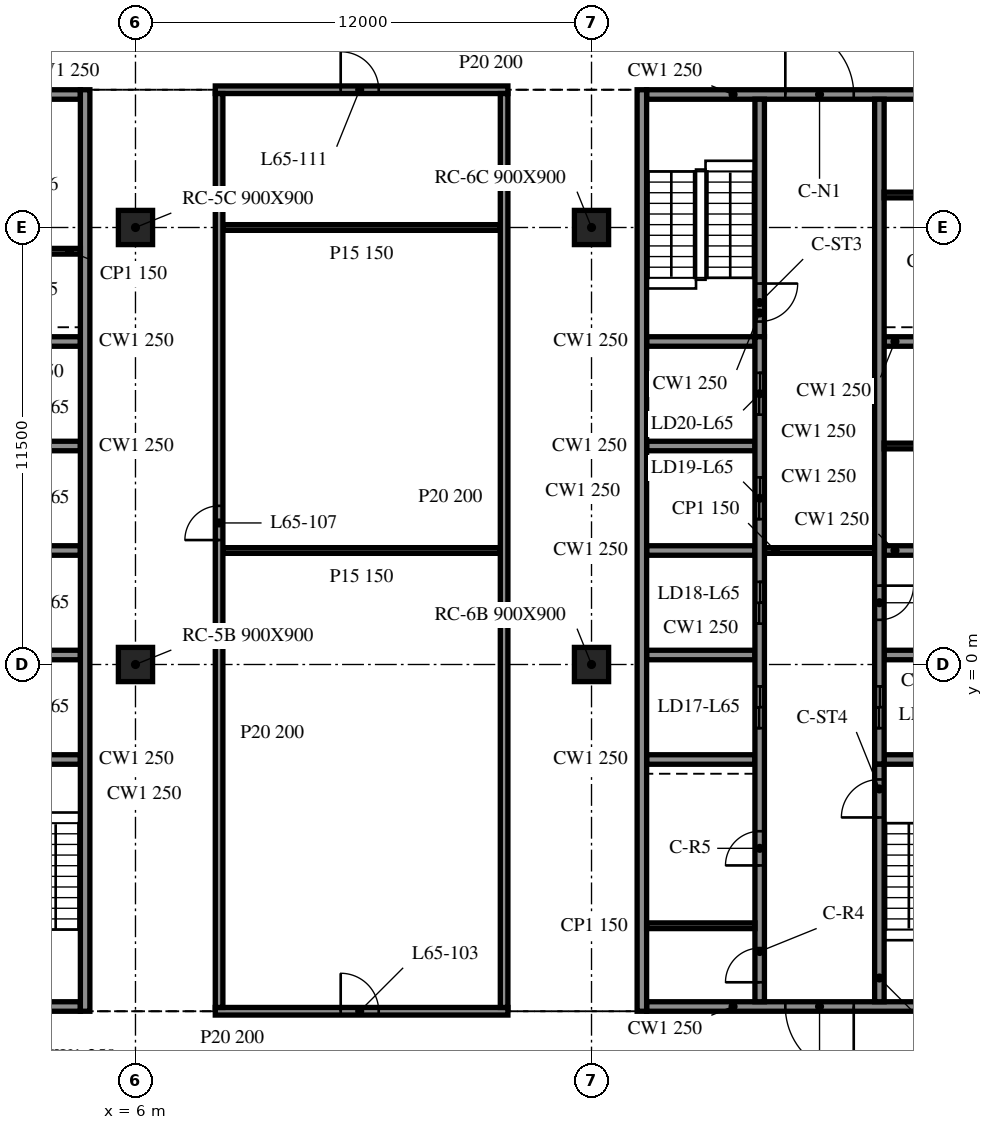
"""IFC4 building model, lengths in metres.
Left out: names, types, materials, properties, quantities, classifications, styles, units other than length and angle.
Written with IfcOpenShell. Run it as: python <this file> out.ifc"""

import sys

from ifc_helpers import new_model, si_unit, direction, frame, frame_2d, origin, origin_2d, place, context, subcontext, project, spatial, rectangle, extrude, element, fill, save


model = new_model("IFC4")
c1 = context("Model", 3, precision=1e-05, world=origin(), true_north=direction((0.0, 1.0)))
c2 = subcontext(c1, "Body", "Model", "MODEL_VIEW")
j1 = project(units=[si_unit("LENGTHUNIT", "METRE"), si_unit("PLANEANGLEUNIT", "RADIAN")], contexts=[c1])
p1 = place(None, origin())
s1 = spatial("IfcSite", under=j1, at=p1, CompositionType="ELEMENT")
p2 = place(p1, origin())
s2 = spatial("IfcBuilding", under=s1, at=p2, CompositionType="ELEMENT")
p3 = place(p2, frame((0.0, 0.0, 267.1)))
s3 = spatial("IfcBuildingStorey", under=s2, at=p3, CompositionType="ELEMENT", Elevation=267.1)
for number, where, z_axis, x_axis in (
    (1, (6.0, 0.0, -0.34), (0.0, 0.0, 1.0), (1.0, 0.0, 0.0)),
    (2, (6.0, 11.5, -0.34), (0.0, 0.0, 1.0), (1.0, 0.0, 0.0)),
    (3, (18.0, 0.0, -0.34), (0.0, 0.0, 1.0), (1.0, 0.0, 0.0)),
    (4, (18.0, 11.5, -0.34), (0.0, 0.0, 1.0), (1.0, 0.0, 0.0)),
):
    element("IfcColumn", number, at=place(p3, frame(where, z_axis=z_axis, x_axis=x_axis)), inside=s3, PredefinedType="COLUMN", context=c2, shape_type="SweptSolid", body=[
        extrude(rectangle(XDim=0.9, YDim=0.9, at=origin_2d()), origin(), (0.0, 0.0, 1.0), 3.8),
    ])
p4 = place(p3, frame((4.675, -9.125, 0.0), z_axis=(0.0, 0.0, 1.0), x_axis=(0.0, 1.0, 0.0)))
e5 = element("IfcWall", 5, at=p4, inside=s3, PredefinedType="SOLIDWALL", context=c2, shape_type="SweptSolid", body=[
    extrude(rectangle(XDim=24.25, YDim=0.25, at=frame_2d((12.125, 0.0))), origin(), (0.0, 0.0, 1.0), 3.46),
])
p5 = place(p3, frame((4.55, -9.0, 0.0), z_axis=(0.0, 0.0, 1.0), x_axis=(-1.0, 0.0, 0.0)))
e6 = element("IfcWall", 6, at=p5, inside=s3, PredefinedType="SOLIDWALL", context=c2, shape_type="SweptSolid", body=[
    extrude(rectangle(XDim=9.1, YDim=0.25, at=frame_2d((4.55, 0.0))), origin(), (0.0, 0.0, 1.0), 3.46),
])
p6 = place(p5, frame((3.65, 0.0, 0.0)))
e7 = element("IfcOpeningElement", 7, at=p6, cuts=e6, PredefinedType="OPENING", context=c2, shape_type="SweptSolid", body=[
    extrude(rectangle(XDim=1.8, YDim=2.1, at=frame_2d((0.9, 1.05))), frame((0.0, 0.135, 0.0), z_axis=(0.0, -1.0, 0.0), x_axis=(1.0, 0.0, 0.0)), (0.0, 0.0, 1.0), 0.27),
])
p7 = place(p3, frame((-4.55, 15.0, 0.0), z_axis=(0.0, 0.0, 1.0), x_axis=(1.0, 0.0, 0.0)))
e8 = element("IfcWall", 8, at=p7, inside=s3, PredefinedType="SOLIDWALL", context=c2, shape_type="SweptSolid", body=[
    extrude(rectangle(XDim=9.1, YDim=0.25, at=frame_2d((4.55, 0.0))), origin(), (0.0, 0.0, 1.0), 3.46),
])
p8 = place(p7, frame((3.65, 0.0, 0.0)))
e9 = element("IfcOpeningElement", 9, at=p8, cuts=e8, PredefinedType="OPENING", context=c2, shape_type="SweptSolid", body=[
    extrude(rectangle(XDim=1.8, YDim=2.1, at=frame_2d((0.9, 1.05))), frame((0.0, 0.135, 0.0), z_axis=(0.0, -1.0, 0.0), x_axis=(1.0, 0.0, 0.0)), (0.0, 0.0, 1.0), 0.27),
])
for number, where, z_axis, x_axis in (
    (10, (1.7, -2.5, 0.0), (0.0, 0.0, 1.0), (1.0, 0.0, 0.0)),
    (11, (1.7, 0.25, 0.0), (0.0, 0.0, 1.0), (1.0, 0.0, 0.0)),
    (12, (1.7, 3.0, 0.0), (0.0, 0.0, 1.0), (1.0, 0.0, 0.0)),
    (13, (1.7, 5.75, 0.0), (0.0, 0.0, 1.0), (1.0, 0.0, 0.0)),
    (14, (1.7, 8.5, 0.0), (0.0, 0.0, 1.0), (1.0, 0.0, 0.0)),
):
    element("IfcWall", number, at=place(p3, frame(where, z_axis=z_axis, x_axis=x_axis)), inside=s3, PredefinedType="SOLIDWALL", context=c2, shape_type="SweptSolid", body=[
        extrude(rectangle(XDim=2.85, YDim=0.25, at=frame_2d((1.425, 0.0))), origin(), (0.0, 0.0, 1.0), 3.46),
    ])
p9 = place(p3, frame((1.7, 10.875, 0.0), z_axis=(0.0, 0.0, 1.0), x_axis=(1.0, 0.0, 0.0)))
e15 = element("IfcWall", 15, at=p9, inside=s3, PredefinedType="PARTITIONING", context=c2, shape_type="SweptSolid", body=[
    extrude(rectangle(XDim=2.85, YDim=0.15, at=frame_2d((1.425, 0.0))), origin(), (0.0, 0.0, 1.0), 3.46),
])
p10 = place(p3, frame((19.325, 15.125, 0.0), z_axis=(0.0, 0.0, 1.0), x_axis=(0.0, -1.0, 0.0)))
e16 = element("IfcWall", 16, at=p10, inside=s3, PredefinedType="SOLIDWALL", context=c2, shape_type="SweptSolid", body=[
    extrude(rectangle(XDim=24.25, YDim=0.25, at=frame_2d((12.125, 0.0))), origin(), (0.0, 0.0, 1.0), 3.46),
])
p11 = place(p3, frame((28.55, -9.0, 0.0), z_axis=(0.0, 0.0, 1.0), x_axis=(-1.0, 0.0, 0.0)))
e17 = element("IfcWall", 17, at=p11, inside=s3, PredefinedType="SOLIDWALL", context=c2, shape_type="SweptSolid", body=[
    extrude(rectangle(XDim=9.1, YDim=0.25, at=frame_2d((4.55, 0.0))), origin(), (0.0, 0.0, 1.0), 3.46),
])
p12 = place(p11, frame((3.65, 0.0, 0.0)))
e18 = element("IfcOpeningElement", 18, at=p12, cuts=e17, PredefinedType="OPENING", context=c2, shape_type="SweptSolid", body=[
    extrude(rectangle(XDim=1.8, YDim=2.1, at=frame_2d((0.9, 1.05))), frame((0.0, 0.135, 0.0), z_axis=(0.0, -1.0, 0.0), x_axis=(1.0, 0.0, 0.0)), (0.0, 0.0, 1.0), 0.27),
])
p13 = place(p3, frame((19.45, 15.0, 0.0), z_axis=(0.0, 0.0, 1.0), x_axis=(1.0, 0.0, 0.0)))
e19 = element("IfcWall", 19, at=p13, inside=s3, PredefinedType="SOLIDWALL", context=c2, shape_type="SweptSolid", body=[
    extrude(rectangle(XDim=9.1, YDim=0.25, at=frame_2d((4.55, 0.0))), origin(), (0.0, 0.0, 1.0), 3.46),
])
p14 = place(p13, frame((3.65, 0.0, 0.0)))
e20 = element("IfcOpeningElement", 20, at=p14, cuts=e19, PredefinedType="OPENING", context=c2, shape_type="SweptSolid", body=[
    extrude(rectangle(XDim=1.8, YDim=2.1, at=frame_2d((0.9, 1.05))), frame((0.0, 0.135, 0.0), z_axis=(0.0, -1.0, 0.0), x_axis=(1.0, 0.0, 0.0)), (0.0, 0.0, 1.0), 0.27),
])
p15 = place(p3, frame((22.425, -8.875, 0.0), z_axis=(0.0, 0.0, 1.0), x_axis=(0.0, 1.0, 0.0)))
e21 = element("IfcWall", 21, at=p15, inside=s3, PredefinedType="SOLIDWALL", context=c2, shape_type="SweptSolid", body=[
    extrude(rectangle(XDim=17.5, YDim=0.25, at=frame_2d((8.75, 0.0))), origin(), (0.0, 0.0, 1.0), 3.46),
])
p16 = place(p15, frame((7.2, 0.0, 0.0)))
e22 = element("IfcOpeningElement", 22, at=p16, cuts=e21, PredefinedType="OPENING", context=c2, shape_type="SweptSolid", body=[
    extrude(rectangle(XDim=1.1, YDim=2.1, at=frame_2d((0.55, 1.05))), frame((0.0, 0.135, 0.0), z_axis=(0.0, -1.0, 0.0), x_axis=(1.0, 0.0, 0.0)), (0.0, 0.0, 1.0), 0.27),
])
p17 = place(p15, frame((9.95, 0.0, 0.0)))
e23 = element("IfcOpeningElement", 23, at=p17, cuts=e21, PredefinedType="OPENING", context=c2, shape_type="SweptSolid", body=[
    extrude(rectangle(XDim=1.1, YDim=2.1, at=frame_2d((0.55, 1.05))), frame((0.0, 0.135, 0.0), z_axis=(0.0, -1.0, 0.0), x_axis=(1.0, 0.0, 0.0)), (0.0, 0.0, 1.0), 0.27),
])
p18 = place(p15, frame((12.7, 0.0, 0.0)))
e24 = element("IfcOpeningElement", 24, at=p18, cuts=e21, PredefinedType="OPENING", context=c2, shape_type="SweptSolid", body=[
    extrude(rectangle(XDim=1.1, YDim=2.1, at=frame_2d((0.55, 1.05))), frame((0.0, 0.135, 0.0), z_axis=(0.0, -1.0, 0.0), x_axis=(1.0, 0.0, 0.0)), (0.0, 0.0, 1.0), 0.27),
])
p19 = place(p15, frame((15.45, 0.0, 0.0)))
e25 = element("IfcOpeningElement", 25, at=p19, cuts=e21, PredefinedType="OPENING", context=c2, shape_type="SweptSolid", body=[
    extrude(rectangle(XDim=1.1, YDim=2.1, at=frame_2d((0.55, 1.05))), frame((0.0, 0.135, 0.0), z_axis=(0.0, -1.0, 0.0), x_axis=(1.0, 0.0, 0.0)), (0.0, 0.0, 1.0), 0.27),
])
p20 = place(p15, frame((0.512, 0.0, 0.0)))
e26 = element("IfcOpeningElement", 26, at=p20, cuts=e21, PredefinedType="OPENING", context=c2, shape_type="SweptSolid", body=[
    extrude(rectangle(XDim=0.9, YDim=2.1, at=frame_2d((0.45, 1.05))), frame((0.0, 0.135, 0.0), z_axis=(0.0, -1.0, 0.0), x_axis=(1.0, 0.0, 0.0)), (0.0, 0.0, 1.0), 0.27),
])
p21 = place(p15, frame((3.587, 0.0, 0.0)))
e27 = element("IfcOpeningElement", 27, at=p21, cuts=e21, PredefinedType="OPENING", context=c2, shape_type="SweptSolid", body=[
    extrude(rectangle(XDim=0.9, YDim=2.1, at=frame_2d((0.45, 1.05))), frame((0.0, 0.135, 0.0), z_axis=(0.0, -1.0, 0.0), x_axis=(1.0, 0.0, 0.0)), (0.0, 0.0, 1.0), 0.27),
])
p22 = place(p3, frame((22.425, 14.875, 0.0), z_axis=(0.0, 0.0, 1.0), x_axis=(0.0, -1.0, 0.0)))
e28 = element("IfcWall", 28, at=p22, inside=s3, PredefinedType="SOLIDWALL", context=c2, shape_type="SweptSolid", body=[
    extrude(rectangle(XDim=6.25, YDim=0.25, at=frame_2d((3.125, 0.0))), origin(), (0.0, 0.0, 1.0), 3.46),
])
p23 = place(p22, frame((4.85, 0.0, 0.0)))
e29 = element("IfcOpeningElement", 29, at=p23, cuts=e28, PredefinedType="OPENING", context=c2, shape_type="SweptSolid", body=[
    extrude(rectangle(XDim=1.0, YDim=2.1, at=frame_2d((0.5, 1.05))), frame((0.0, 0.135, 0.0), z_axis=(0.0, -1.0, 0.0), x_axis=(1.0, 0.0, 0.0)), (0.0, 0.0, 1.0), 0.27),
])
p24 = place(p3, frame((25.575, -8.875, 0.0), z_axis=(0.0, 0.0, 1.0), x_axis=(0.0, 1.0, 0.0)))
e30 = element("IfcWall", 30, at=p24, inside=s3, PredefinedType="SOLIDWALL", context=c2, shape_type="SweptSolid", body=[
    extrude(rectangle(XDim=6.25, YDim=0.25, at=frame_2d((3.125, 0.0))), origin(), (0.0, 0.0, 1.0), 3.46),
])
p25 = place(p24, frame((4.85, 0.0, 0.0)))
e31 = element("IfcOpeningElement", 31, at=p25, cuts=e30, PredefinedType="OPENING", context=c2, shape_type="SweptSolid", body=[
    extrude(rectangle(XDim=1.0, YDim=2.1, at=frame_2d((0.5, 1.05))), frame((0.0, 0.135, 0.0), z_axis=(0.0, -1.0, 0.0), x_axis=(1.0, 0.0, 0.0)), (0.0, 0.0, 1.0), 0.27),
])
p26 = place(p3, frame((25.575, 14.875, 0.0), z_axis=(0.0, 0.0, 1.0), x_axis=(0.0, -1.0, 0.0)))
e32 = element("IfcWall", 32, at=p26, inside=s3, PredefinedType="SOLIDWALL", context=c2, shape_type="SweptSolid", body=[
    extrude(rectangle(XDim=17.5, YDim=0.25, at=frame_2d((8.75, 0.0))), origin(), (0.0, 0.0, 1.0), 3.46),
])
p27 = place(p26, frame((15.45, 0.0, 0.0)))
e33 = element("IfcOpeningElement", 33, at=p27, cuts=e32, PredefinedType="OPENING", context=c2, shape_type="SweptSolid", body=[
    extrude(rectangle(XDim=1.1, YDim=2.1, at=frame_2d((0.55, 1.05))), frame((0.0, 0.135, 0.0), z_axis=(0.0, -1.0, 0.0), x_axis=(1.0, 0.0, 0.0)), (0.0, 0.0, 1.0), 0.27),
])
p28 = place(p26, frame((12.8, 0.0, 0.0)))
e34 = element("IfcOpeningElement", 34, at=p28, cuts=e32, PredefinedType="OPENING", context=c2, shape_type="SweptSolid", body=[
    extrude(rectangle(XDim=0.9, YDim=2.1, at=frame_2d((0.45, 1.05))), frame((0.0, 0.135, 0.0), z_axis=(0.0, -1.0, 0.0), x_axis=(1.0, 0.0, 0.0)), (0.0, 0.0, 1.0), 0.27),
])
for number, where, z_axis, x_axis in (
    (35, (19.45, -2.5, 0.0), (0.0, 0.0, 1.0), (1.0, 0.0, 0.0)),
    (36, (19.45, 0.25, 0.0), (0.0, 0.0, 1.0), (1.0, 0.0, 0.0)),
    (37, (19.45, 3.0, 0.0), (0.0, 0.0, 1.0), (1.0, 0.0, 0.0)),
    (38, (19.45, 5.75, 0.0), (0.0, 0.0, 1.0), (1.0, 0.0, 0.0)),
    (39, (19.45, 8.5, 0.0), (0.0, 0.0, 1.0), (1.0, 0.0, 0.0)),
    (40, (25.7, -2.5, 0.0), (0.0, 0.0, 1.0), (1.0, 0.0, 0.0)),
    (41, (25.7, 0.25, 0.0), (0.0, 0.0, 1.0), (1.0, 0.0, 0.0)),
    (42, (25.7, 3.0, 0.0), (0.0, 0.0, 1.0), (1.0, 0.0, 0.0)),
    (43, (25.7, 8.5, 0.0), (0.0, 0.0, 1.0), (1.0, 0.0, 0.0)),
):
    element("IfcWall", number, at=place(p3, frame(where, z_axis=z_axis, x_axis=x_axis)), inside=s3, PredefinedType="SOLIDWALL", context=c2, shape_type="SweptSolid", body=[
        extrude(rectangle(XDim=2.85, YDim=0.25, at=frame_2d((1.425, 0.0))), origin(), (0.0, 0.0, 1.0), 3.46),
    ])
p29 = place(p3, frame((22.55, 3.0, 0.0), z_axis=(0.0, 0.0, 1.0), x_axis=(1.0, 0.0, 0.0)))
e44 = element("IfcWall", 44, at=p29, inside=s3, PredefinedType="PARTITIONING", context=c2, shape_type="SweptSolid", body=[
    extrude(rectangle(XDim=2.9, YDim=0.15, at=frame_2d((1.45, 0.0))), origin(), (0.0, 0.0, 1.0), 3.46),
])
for number, where, z_axis, x_axis in (
    (45, (25.7, 5.75, 0.0), (0.0, 0.0, 1.0), (1.0, 0.0, 0.0)),
    (46, (19.45, -6.875, 0.0), (0.0, 0.0, 1.0), (1.0, 0.0, 0.0)),
    (47, (25.7, 12.355, 0.0), (0.0, 0.0, 1.0), (1.0, 0.0, 0.0)),
):
    element("IfcWall", number, at=place(p3, frame(where, z_axis=z_axis, x_axis=x_axis)), inside=s3, PredefinedType="PARTITIONING", context=c2, shape_type="SweptSolid", body=[
        extrude(rectangle(XDim=2.85, YDim=0.15, at=frame_2d((1.425, 0.0))), origin(), (0.0, 0.0, 1.0), 3.46),
    ])
p30 = place(p3, frame((8.1, -9.125, 0.0), z_axis=(0.0, 0.0, 1.0), x_axis=(1.0, 0.0, 0.0)))
e48 = element("IfcWall", 48, at=p30, inside=s3, PredefinedType="PARTITIONING", context=c2, shape_type="SweptSolid", body=[
    extrude(rectangle(XDim=7.7, YDim=0.2, at=frame_2d((3.85, 0.0))), origin(), (0.0, 0.0, 1.0), 3.46),
])
p31 = place(p30, frame((3.3, 0.0, 0.0)))
e49 = element("IfcOpeningElement", 49, at=p31, cuts=e48, PredefinedType="OPENING", context=c2, shape_type="SweptSolid", body=[
    extrude(rectangle(XDim=1.0, YDim=2.1, at=frame_2d((0.5, 1.05))), frame((0.0, 0.11, 0.0), z_axis=(0.0, -1.0, 0.0), x_axis=(1.0, 0.0, 0.0)), (0.0, 0.0, 1.0), 0.22),
])
for number, where, z_axis, x_axis in (
    (50, (8.3, 3.0, 0.0), (0.0, 0.0, 1.0), (1.0, 0.0, 0.0)),
    (51, (8.3, 11.5, 0.0), (0.0, 0.0, 1.0), (1.0, 0.0, 0.0)),
):
    element("IfcWall", number, at=place(p3, frame(where, z_axis=z_axis, x_axis=x_axis)), inside=s3, PredefinedType="PARTITIONING", context=c2, shape_type="SweptSolid", body=[
        extrude(rectangle(XDim=7.3, YDim=0.15, at=frame_2d((3.65, 0.0))), origin(), (0.0, 0.0, 1.0), 3.46),
    ])
p32 = place(p3, frame((8.1, 15.125, 0.0), z_axis=(0.0, 0.0, 1.0), x_axis=(1.0, 0.0, 0.0)))
e52 = element("IfcWall", 52, at=p32, inside=s3, PredefinedType="PARTITIONING", context=c2, shape_type="SweptSolid", body=[
    extrude(rectangle(XDim=7.7, YDim=0.2, at=frame_2d((3.85, 0.0))), origin(), (0.0, 0.0, 1.0), 3.46),
])
p33 = place(p32, frame((3.3, 0.0, 0.0)))
e53 = element("IfcOpeningElement", 53, at=p33, cuts=e52, PredefinedType="OPENING", context=c2, shape_type="SweptSolid", body=[
    extrude(rectangle(XDim=1.0, YDim=2.1, at=frame_2d((0.5, 1.05))), frame((0.0, 0.11, 0.0), z_axis=(0.0, -1.0, 0.0), x_axis=(1.0, 0.0, 0.0)), (0.0, 0.0, 1.0), 0.22),
])
p34 = place(p3, frame((8.2, -9.025, 0.0), z_axis=(0.0, 0.0, 1.0), x_axis=(0.0, 1.0, 0.0)))
e54 = element("IfcWall", 54, at=p34, inside=s3, PredefinedType="PARTITIONING", context=c2, shape_type="SweptSolid", body=[
    extrude(rectangle(XDim=24.05, YDim=0.2, at=frame_2d((12.025, 0.0))), origin(), (0.0, 0.0, 1.0), 3.46),
])
p35 = place(p34, frame((12.3, 0.0, 0.0)))
e55 = element("IfcOpeningElement", 55, at=p35, cuts=e54, PredefinedType="OPENING", context=c2, shape_type="SweptSolid", body=[
    extrude(rectangle(XDim=0.9, YDim=2.1, at=frame_2d((0.45, 1.05))), frame((0.0, 0.11, 0.0), z_axis=(0.0, -1.0, 0.0), x_axis=(1.0, 0.0, 0.0)), (0.0, 0.0, 1.0), 0.22),
])
p36 = place(p3, frame((15.7, -9.025, 0.0), z_axis=(0.0, 0.0, 1.0), x_axis=(0.0, 1.0, 0.0)))
e56 = element("IfcWall", 56, at=p36, inside=s3, PredefinedType="PARTITIONING", context=c2, shape_type="SweptSolid", body=[
    extrude(rectangle(XDim=24.05, YDim=0.2, at=frame_2d((12.025, 0.0))), origin(), (0.0, 0.0, 1.0), 3.46),
])
p37 = place(p12, origin())
e57 = element("IfcDoor", 57, at=p37, inside=s3, OperationType="DOUBLE_DOOR_SINGLE_SWING", PredefinedType="DOOR", context=c2, shape_type="SweptSolid", body=[
    extrude(rectangle(XDim=1.8, YDim=2.1, at=frame_2d((0.9, 1.05))), frame((0.0, 0.025, 0.0), z_axis=(0.0, -1.0, 0.0), x_axis=(1.0, 0.0, 0.0)), (0.0, 0.0, 1.0), 0.05),
])
fill(e18, e57)
p38 = place(p14, origin())
e58 = element("IfcDoor", 58, at=p38, inside=s3, OperationType="DOUBLE_DOOR_SINGLE_SWING", PredefinedType="DOOR", context=c2, shape_type="SweptSolid", body=[
    extrude(rectangle(XDim=1.8, YDim=2.1, at=frame_2d((0.9, 1.05))), frame((0.0, 0.025, 0.0), z_axis=(0.0, -1.0, 0.0), x_axis=(1.0, 0.0, 0.0)), (0.0, 0.0, 1.0), 0.05),
])
fill(e20, e58)
p39 = place(p27, origin())
e59 = element("IfcDoor", 59, at=p39, inside=s3, OperationType="DOUBLE_DOOR_SLIDING", PredefinedType="DOOR", context=c2, shape_type="SweptSolid", body=[
    extrude(rectangle(XDim=1.1, YDim=2.1, at=frame_2d((0.55, 1.05))), frame((0.0, 0.025, 0.0), z_axis=(0.0, -1.0, 0.0), x_axis=(1.0, 0.0, 0.0)), (0.0, 0.0, 1.0), 0.05),
])
fill(e33, e59)
p40 = place(p16, origin())
e60 = element("IfcDoor", 60, at=p40, inside=s3, OperationType="DOUBLE_DOOR_SLIDING", PredefinedType="DOOR", context=c2, shape_type="SweptSolid", body=[
    extrude(rectangle(XDim=1.1, YDim=2.1, at=frame_2d((0.55, 1.05))), frame((0.0, 0.025, 0.0), z_axis=(0.0, -1.0, 0.0), x_axis=(1.0, 0.0, 0.0)), (0.0, 0.0, 1.0), 0.05),
])
fill(e22, e60)
p41 = place(p17, origin())
e61 = element("IfcDoor", 61, at=p41, inside=s3, OperationType="DOUBLE_DOOR_SLIDING", PredefinedType="DOOR", context=c2, shape_type="SweptSolid", body=[
    extrude(rectangle(XDim=1.1, YDim=2.1, at=frame_2d((0.55, 1.05))), frame((0.0, 0.025, 0.0), z_axis=(0.0, -1.0, 0.0), x_axis=(1.0, 0.0, 0.0)), (0.0, 0.0, 1.0), 0.05),
])
fill(e23, e61)
p42 = place(p18, origin())
e62 = element("IfcDoor", 62, at=p42, inside=s3, OperationType="DOUBLE_DOOR_SLIDING", PredefinedType="DOOR", context=c2, shape_type="SweptSolid", body=[
    extrude(rectangle(XDim=1.1, YDim=2.1, at=frame_2d((0.55, 1.05))), frame((0.0, 0.025, 0.0), z_axis=(0.0, -1.0, 0.0), x_axis=(1.0, 0.0, 0.0)), (0.0, 0.0, 1.0), 0.05),
])
fill(e24, e62)
p43 = place(p19, origin())
e63 = element("IfcDoor", 63, at=p43, inside=s3, OperationType="DOUBLE_DOOR_SLIDING", PredefinedType="DOOR", context=c2, shape_type="SweptSolid", body=[
    extrude(rectangle(XDim=1.1, YDim=2.1, at=frame_2d((0.55, 1.05))), frame((0.0, 0.025, 0.0), z_axis=(0.0, -1.0, 0.0), x_axis=(1.0, 0.0, 0.0)), (0.0, 0.0, 1.0), 0.05),
])
fill(e25, e63)
p44 = place(p28, origin())
e64 = element("IfcDoor", 64, at=p44, inside=s3, OperationType="SINGLE_SWING_LEFT", PredefinedType="DOOR", context=c2, shape_type="SweptSolid", body=[
    extrude(rectangle(XDim=0.9, YDim=2.1, at=frame_2d((0.45, 1.05))), frame((0.0, 0.025, 0.0), z_axis=(0.0, -1.0, 0.0), x_axis=(1.0, 0.0, 0.0)), (0.0, 0.0, 1.0), 0.05),
])
fill(e34, e64)
p45 = place(p20, origin())
e65 = element("IfcDoor", 65, at=p45, inside=s3, OperationType="SINGLE_SWING_RIGHT", PredefinedType="DOOR", context=c2, shape_type="SweptSolid", body=[
    extrude(rectangle(XDim=0.9, YDim=2.1, at=frame_2d((0.45, 1.05))), frame((0.0, 0.025, 0.0), z_axis=(0.0, -1.0, 0.0), x_axis=(1.0, 0.0, 0.0)), (0.0, 0.0, 1.0), 0.05),
])
fill(e26, e65)
p46 = place(p21, origin())
e66 = element("IfcDoor", 66, at=p46, inside=s3, OperationType="SINGLE_SWING_LEFT", PredefinedType="DOOR", context=c2, shape_type="SweptSolid", body=[
    extrude(rectangle(XDim=0.9, YDim=2.1, at=frame_2d((0.45, 1.05))), frame((0.0, 0.025, 0.0), z_axis=(0.0, -1.0, 0.0), x_axis=(1.0, 0.0, 0.0)), (0.0, 0.0, 1.0), 0.05),
])
fill(e27, e66)
p47 = place(p23, origin())
e67 = element("IfcDoor", 67, at=p47, inside=s3, OperationType="SINGLE_SWING_RIGHT", PredefinedType="DOOR", context=c2, shape_type="SweptSolid", body=[
    extrude(rectangle(XDim=1.0, YDim=2.1, at=frame_2d((0.5, 1.05))), frame((0.0, 0.025, 0.0), z_axis=(0.0, -1.0, 0.0), x_axis=(1.0, 0.0, 0.0)), (0.0, 0.0, 1.0), 0.05),
])
fill(e29, e67)
p48 = place(p25, origin())
e68 = element("IfcDoor", 68, at=p48, inside=s3, OperationType="SINGLE_SWING_LEFT", PredefinedType="DOOR", context=c2, shape_type="SweptSolid", body=[
    extrude(rectangle(XDim=1.0, YDim=2.1, at=frame_2d((0.5, 1.05))), frame((0.0, 0.025, 0.0), z_axis=(0.0, -1.0, 0.0), x_axis=(1.0, 0.0, 0.0)), (0.0, 0.0, 1.0), 0.05),
])
fill(e31, e68)
p49 = place(p31, origin())
e69 = element("IfcDoor", 69, at=p49, inside=s3, OperationType="SINGLE_SWING_LEFT", PredefinedType="DOOR", context=c2, shape_type="SweptSolid", body=[
    extrude(rectangle(XDim=1.0, YDim=2.1, at=frame_2d((0.5, 1.05))), frame((0.0, 0.025, 0.0), z_axis=(0.0, -1.0, 0.0), x_axis=(1.0, 0.0, 0.0)), (0.0, 0.0, 1.0), 0.05),
])
fill(e49, e69)
p50 = place(p35, origin())
e70 = element("IfcDoor", 70, at=p50, inside=s3, OperationType="SINGLE_SWING_LEFT", PredefinedType="DOOR", context=c2, shape_type="SweptSolid", body=[
    extrude(rectangle(XDim=0.9, YDim=2.1, at=frame_2d((0.45, 1.05))), frame((0.0, 0.025, 0.0), z_axis=(0.0, -1.0, 0.0), x_axis=(1.0, 0.0, 0.0)), (0.0, 0.0, 1.0), 0.05),
])
fill(e55, e70)
p51 = place(p33, origin())
e71 = element("IfcDoor", 71, at=p51, inside=s3, OperationType="SINGLE_SWING_RIGHT", PredefinedType="DOOR", context=c2, shape_type="SweptSolid", body=[
    extrude(rectangle(XDim=1.0, YDim=2.1, at=frame_2d((0.5, 1.05))), frame((0.0, 0.025, 0.0), z_axis=(0.0, -1.0, 0.0), x_axis=(1.0, 0.0, 0.0)), (0.0, 0.0, 1.0), 0.05),
])
fill(e53, e71)
save(model, sys.argv[1])
